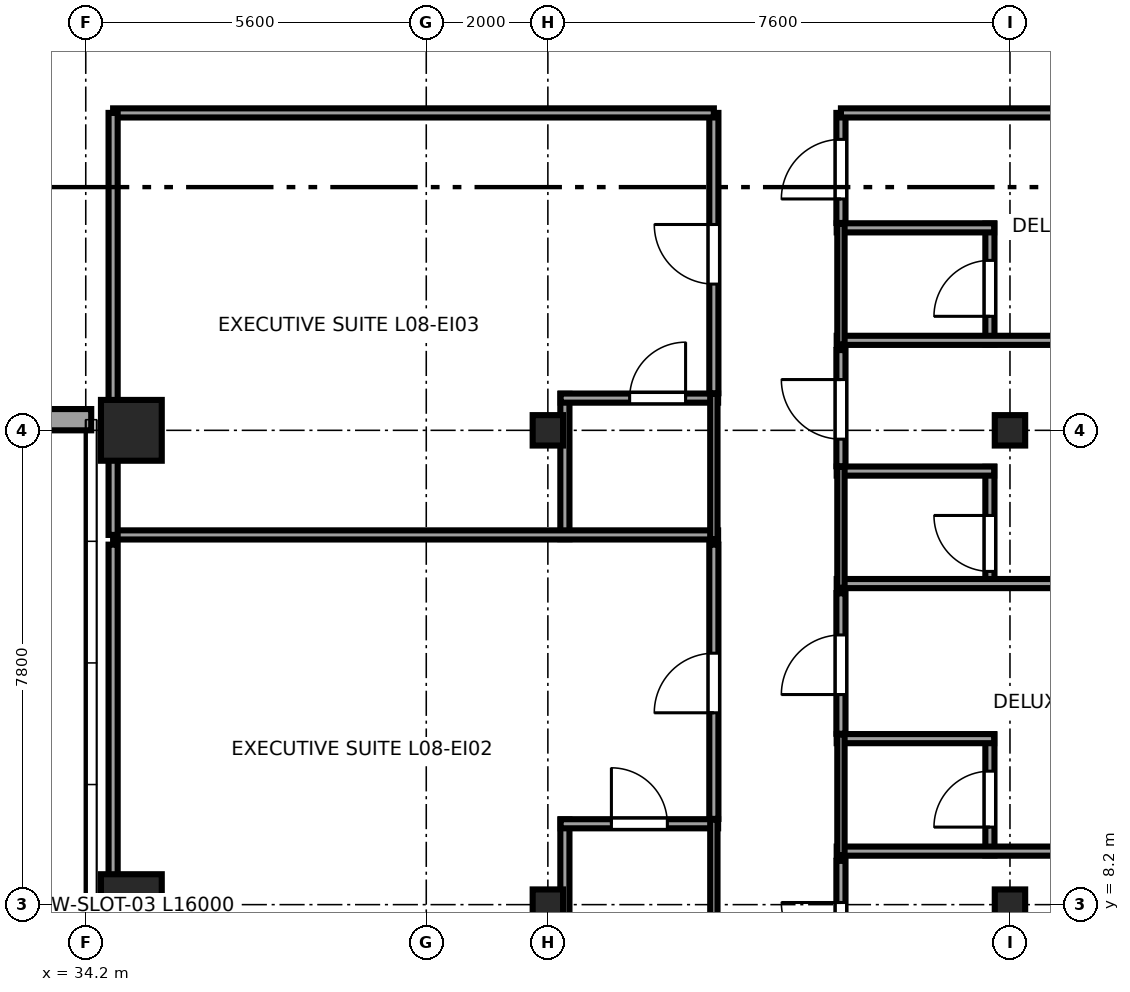
"""IFC4 building model, lengths in metres.
Left out: names, types, materials, properties, quantities, classifications, styles, units other than length and angle.
Written with IfcOpenShell. Run it as: python <this file> out.ifc"""

import sys

from ifc_helpers import new_model, si_unit, direction, frame, frame_2d, origin, origin_2d, place, context, subcontext, project, spatial, rectangle, i_section, extrude, source, transform, mapped, element, fill, save


model = new_model("IFC4")
c1 = context("Model", 3, precision=1e-05, world=origin(), true_north=direction((0.0, 1.0)))
c2 = subcontext(c1, "Body", "Model", "MODEL_VIEW")
j1 = project(units=[si_unit("LENGTHUNIT", "METRE"), si_unit("PLANEANGLEUNIT", "RADIAN")], contexts=[c1])
p1 = place(None, origin())
s1 = spatial("IfcSite", under=j1, at=p1, CompositionType="ELEMENT")
p2 = place(p1, origin())
s2 = spatial("IfcBuilding", under=s1, at=p2, CompositionType="ELEMENT")
p3 = place(p2, frame((0.0, 0.0, 39.1)))
s3 = spatial("IfcBuildingStorey", under=s2, at=p3, CompositionType="ELEMENT", Elevation=39.1)
m1 = source(origin(), c2, "Body", "SweptSolid", [
    extrude(rectangle(XDim=1.0, YDim=1.0, at=origin_2d()), origin(), (0.0, 0.0, 1.0), 3.55),
])
for number, where, z_axis, x_axis in (
    (1, (34.95, 8.2, 0.0), (0.0, 0.0, 1.0), (1.0, 0.0, 0.0)),
    (2, (34.95, 16.0, 0.0), (0.0, 0.0, 1.0), (1.0, 0.0, 0.0)),
):
    element("IfcColumn", number, at=place(p3, frame(where, z_axis=z_axis, x_axis=x_axis)), inside=s3, PredefinedType="COLUMN", context=c2, shape_type="MappedRepresentation", body=[
        mapped(m1, transform((0.0, 0.0, 0.0), x_axis=(1.0, 0.0, 0.0), y_axis=(0.0, 1.0, 0.0), z_axis=(0.0, 0.0, 1.0), scale=1.0)),
    ])
m2 = source(origin(), c2, "Body", "SweptSolid", [
    extrude(i_section(OverallWidth=0.5, OverallDepth=0.5, WebThickness=0.028, FlangeThickness=0.045, at=origin_2d()), origin(), (0.0, 0.0, 1.0), 3.55),
])
for number, where, z_axis, x_axis in (
    (3, (41.8, 8.2, 0.0), (0.0, 0.0, 1.0), (1.0, 0.0, 0.0)),
    (4, (41.8, 16.0, 0.0), (0.0, 0.0, 1.0), (1.0, 0.0, 0.0)),
    (5, (49.4, 8.2, 0.0), (0.0, 0.0, 1.0), (1.0, 0.0, 0.0)),
    (6, (49.4, 16.0, 0.0), (0.0, 0.0, 1.0), (1.0, 0.0, 0.0)),
):
    element("IfcColumn", number, at=place(p3, frame(where, z_axis=z_axis, x_axis=x_axis)), inside=s3, PredefinedType="COLUMN", context=c2, shape_type="MappedRepresentation", body=[
        mapped(m2, transform((0.0, 0.0, 0.0), x_axis=(1.0, 0.0, 0.0), y_axis=(0.0, 1.0, 0.0), z_axis=(0.0, 0.0, 1.0), scale=1.0)),
    ])
p4 = place(p3, frame((22.71, 16.175, 0.0), z_axis=(0.0, 0.0, 1.0), x_axis=(1.0, 0.0, 0.0)))
e7 = element("IfcWall", 7, at=p4, inside=s3, PredefinedType="SOLIDWALL", context=c2, shape_type="SweptSolid", body=[
    extrude(rectangle(XDim=11.58, YDim=0.35, at=frame_2d((5.79, 0.0))), origin(), (0.0, 0.0, 1.0), 2.748),
])
p5 = place(p4, frame((2.295, 0.0, 0.68)))
e8 = element("IfcOpeningElement", 8, at=p5, cuts=e7, PredefinedType="OPENING", context=c2, shape_type="SweptSolid", body=[
    extrude(rectangle(XDim=1.8, YDim=1.85, at=frame_2d((0.9, 0.925))), frame((0.0, 0.185, 0.0), z_axis=(0.0, -1.0, 0.0), x_axis=(1.0, 0.0, 0.0)), (0.0, 0.0, 1.0), 0.37),
])
p6 = place(p4, frame((7.485, 0.0, 0.68)))
e9 = element("IfcOpeningElement", 9, at=p6, cuts=e7, PredefinedType="OPENING", context=c2, shape_type="SweptSolid", body=[
    extrude(rectangle(XDim=1.8, YDim=1.85, at=frame_2d((0.9, 0.925))), frame((0.0, 0.185, 0.0), z_axis=(0.0, -1.0, 0.0), x_axis=(1.0, 0.0, 0.0)), (0.0, 0.0, 1.0), 0.37),
])
p7 = place(p3, frame((42.08, 7.21, 0.0), z_axis=(0.0, 0.0, 1.0), x_axis=(0.0, 1.0, 0.0)))
e10 = element("IfcWall", 10, at=p7, inside=s3, PredefinedType="PARTITIONING", context=c2, shape_type="SweptSolid", body=[
    extrude(rectangle(XDim=2.39, YDim=0.15, at=frame_2d((1.195, 0.0))), origin(), (0.0, 0.0, 1.0), 3.37),
])
p8 = place(p3, frame((42.01, 9.53, 0.0), z_axis=(0.0, 0.0, 1.0), x_axis=(1.0, 0.0, 0.0)))
e11 = element("IfcWall", 11, at=p8, inside=s3, PredefinedType="PARTITIONING", context=c2, shape_type="SweptSolid", body=[
    extrude(rectangle(XDim=2.59, YDim=0.15, at=frame_2d((1.295, 0.0))), origin(), (0.0, 0.0, 1.0), 3.37),
])
p9 = place(p8, frame((0.835, 0.0, 0.0)))
e12 = element("IfcOpeningElement", 12, at=p9, cuts=e11, PredefinedType="OPENING", context=c2, shape_type="SweptSolid", body=[
    extrude(rectangle(XDim=0.92, YDim=2.01, at=frame_2d((0.46, 1.005))), frame((0.0, 0.085, 0.0), z_axis=(0.0, -1.0, 0.0), x_axis=(1.0, 0.0, 0.0)), (0.0, 0.0, 1.0), 0.17),
])
p10 = place(p3, frame((44.53, 7.21, 0.0), z_axis=(0.0, 0.0, 1.0), x_axis=(0.0, 1.0, 0.0)))
e13 = element("IfcWall", 13, at=p10, inside=s3, PredefinedType="PLUMBINGWALL", context=c2, shape_type="SweptSolid", body=[
    extrude(rectangle(XDim=2.39, YDim=0.12, at=frame_2d((1.195, 0.0))), origin(), (0.0, 0.0, 1.0), 3.37),
])
p11 = place(p3, frame((42.08, 14.21, 0.0), z_axis=(0.0, 0.0, 1.0), x_axis=(0.0, 1.0, 0.0)))
e14 = element("IfcWall", 14, at=p11, inside=s3, PredefinedType="PARTITIONING", context=c2, shape_type="SweptSolid", body=[
    extrude(rectangle(XDim=2.39, YDim=0.15, at=frame_2d((1.195, 0.0))), origin(), (0.0, 0.0, 1.0), 3.37),
])
p12 = place(p3, frame((34.65, 14.28, 0.0), z_axis=(0.0, 0.0, 1.0), x_axis=(1.0, 0.0, 0.0)))
e15 = element("IfcWall", 15, at=p12, inside=s3, PredefinedType="PARTITIONING", context=c2, shape_type="SweptSolid", body=[
    extrude(rectangle(XDim=9.95, YDim=0.15, at=frame_2d((4.975, 0.0))), origin(), (0.0, 0.0, 1.0), 3.37),
])
p13 = place(p3, frame((42.01, 16.53, 0.0), z_axis=(0.0, 0.0, 1.0), x_axis=(1.0, 0.0, 0.0)))
e16 = element("IfcWall", 16, at=p13, inside=s3, PredefinedType="PARTITIONING", context=c2, shape_type="SweptSolid", body=[
    extrude(rectangle(XDim=2.59, YDim=0.15, at=frame_2d((1.295, 0.0))), origin(), (0.0, 0.0, 1.0), 3.37),
])
p14 = place(p13, frame((1.135, 0.0, 0.0)))
e17 = element("IfcOpeningElement", 17, at=p14, cuts=e16, PredefinedType="OPENING", context=c2, shape_type="SweptSolid", body=[
    extrude(rectangle(XDim=0.92, YDim=2.01, at=frame_2d((0.46, 1.005))), frame((0.0, 0.085, 0.0), z_axis=(0.0, -1.0, 0.0), x_axis=(1.0, 0.0, 0.0)), (0.0, 0.0, 1.0), 0.17),
])
p15 = place(p3, frame((44.53, 14.21, 0.0), z_axis=(0.0, 0.0, 1.0), x_axis=(0.0, 1.0, 0.0)))
e18 = element("IfcWall", 18, at=p15, inside=s3, PredefinedType="PLUMBINGWALL", context=c2, shape_type="SweptSolid", body=[
    extrude(rectangle(XDim=2.39, YDim=0.12, at=frame_2d((1.195, 0.0))), origin(), (0.0, 0.0, 1.0), 3.37),
])
p16 = place(p3, frame((49.07, 9.01, 0.0), z_axis=(0.0, 0.0, 1.0), x_axis=(0.0, 1.0, 0.0)))
e19 = element("IfcWall", 19, at=p16, inside=s3, PredefinedType="PARTITIONING", context=c2, shape_type="SweptSolid", body=[
    extrude(rectangle(XDim=1.99, YDim=0.15, at=frame_2d((0.995, 0.0))), origin(), (0.0, 0.0, 1.0), 3.37),
])
p17 = place(p16, frame((0.465, 0.0, 0.0)))
e20 = element("IfcOpeningElement", 20, at=p17, cuts=e19, PredefinedType="OPENING", context=c2, shape_type="SweptSolid", body=[
    extrude(rectangle(XDim=0.92, YDim=2.01, at=frame_2d((0.46, 1.005))), frame((0.0, 0.085, 0.0), z_axis=(0.0, -1.0, 0.0), x_axis=(1.0, 0.0, 0.0)), (0.0, 0.0, 1.0), 0.17),
])
p18 = place(p3, frame((46.55, 9.08, 0.0), z_axis=(0.0, 0.0, 1.0), x_axis=(1.0, 0.0, 0.0)))
e21 = element("IfcWall", 21, at=p18, inside=s3, PredefinedType="PARTITIONING", context=c2, shape_type="SweptSolid", body=[
    extrude(rectangle(XDim=10.045, YDim=0.15, at=frame_2d((5.022, 0.0))), origin(), (0.0, 0.0, 1.0), 3.37),
])
p19 = place(p3, frame((46.55, 10.93, 0.0), z_axis=(0.0, 0.0, 1.0), x_axis=(1.0, 0.0, 0.0)))
e22 = element("IfcWall", 22, at=p19, inside=s3, PredefinedType="PARTITIONING", context=c2, shape_type="SweptSolid", body=[
    extrude(rectangle(XDim=2.59, YDim=0.15, at=frame_2d((1.295, 0.0))), origin(), (0.0, 0.0, 1.0), 3.37),
])
p20 = place(p3, frame((46.62, 9.01, 0.0), z_axis=(0.0, 0.0, 1.0), x_axis=(0.0, 1.0, 0.0)))
e23 = element("IfcWall", 23, at=p20, inside=s3, PredefinedType="PLUMBINGWALL", context=c2, shape_type="SweptSolid", body=[
    extrude(rectangle(XDim=1.99, YDim=0.12, at=frame_2d((0.995, 0.0))), origin(), (0.0, 0.0, 1.0), 3.37),
])
p21 = place(p3, frame((49.07, 13.41, 0.0), z_axis=(0.0, 0.0, 1.0), x_axis=(0.0, 1.0, 0.0)))
e24 = element("IfcWall", 24, at=p21, inside=s3, PredefinedType="PARTITIONING", context=c2, shape_type="SweptSolid", body=[
    extrude(rectangle(XDim=1.99, YDim=0.15, at=frame_2d((0.995, 0.0))), origin(), (0.0, 0.0, 1.0), 3.37),
])
p22 = place(p21, frame((0.27, 0.0, 0.0)))
e25 = element("IfcOpeningElement", 25, at=p22, cuts=e24, PredefinedType="OPENING", context=c2, shape_type="SweptSolid", body=[
    extrude(rectangle(XDim=0.92, YDim=2.01, at=frame_2d((0.46, 1.005))), frame((0.0, 0.085, 0.0), z_axis=(0.0, -1.0, 0.0), x_axis=(1.0, 0.0, 0.0)), (0.0, 0.0, 1.0), 0.17),
])
p23 = place(p3, frame((46.55, 13.48, 0.0), z_axis=(0.0, 0.0, 1.0), x_axis=(1.0, 0.0, 0.0)))
e26 = element("IfcWall", 26, at=p23, inside=s3, PredefinedType="PARTITIONING", context=c2, shape_type="SweptSolid", body=[
    extrude(rectangle(XDim=10.045, YDim=0.15, at=frame_2d((5.022, 0.0))), origin(), (0.0, 0.0, 1.0), 3.37),
])
p24 = place(p3, frame((46.55, 15.33, 0.0), z_axis=(0.0, 0.0, 1.0), x_axis=(1.0, 0.0, 0.0)))
e27 = element("IfcWall", 27, at=p24, inside=s3, PredefinedType="PARTITIONING", context=c2, shape_type="SweptSolid", body=[
    extrude(rectangle(XDim=2.59, YDim=0.15, at=frame_2d((1.295, 0.0))), origin(), (0.0, 0.0, 1.0), 3.37),
])
p25 = place(p3, frame((46.62, 13.41, 0.0), z_axis=(0.0, 0.0, 1.0), x_axis=(0.0, 1.0, 0.0)))
e28 = element("IfcWall", 28, at=p25, inside=s3, PredefinedType="PLUMBINGWALL", context=c2, shape_type="SweptSolid", body=[
    extrude(rectangle(XDim=1.99, YDim=0.12, at=frame_2d((0.995, 0.0))), origin(), (0.0, 0.0, 1.0), 3.37),
])
p26 = place(p3, frame((49.07, 17.41, 0.0), z_axis=(0.0, 0.0, 1.0), x_axis=(0.0, 1.0, 0.0)))
e29 = element("IfcWall", 29, at=p26, inside=s3, PredefinedType="PARTITIONING", context=c2, shape_type="SweptSolid", body=[
    extrude(rectangle(XDim=1.99, YDim=0.15, at=frame_2d((0.995, 0.0))), origin(), (0.0, 0.0, 1.0), 3.37),
])
p27 = place(p26, frame((0.465, 0.0, 0.0)))
e30 = element("IfcOpeningElement", 30, at=p27, cuts=e29, PredefinedType="OPENING", context=c2, shape_type="SweptSolid", body=[
    extrude(rectangle(XDim=0.92, YDim=2.01, at=frame_2d((0.46, 1.005))), frame((0.0, 0.085, 0.0), z_axis=(0.0, -1.0, 0.0), x_axis=(1.0, 0.0, 0.0)), (0.0, 0.0, 1.0), 0.17),
])
p28 = place(p3, frame((46.55, 17.48, 0.0), z_axis=(0.0, 0.0, 1.0), x_axis=(1.0, 0.0, 0.0)))
e31 = element("IfcWall", 31, at=p28, inside=s3, PredefinedType="PARTITIONING", context=c2, shape_type="SweptSolid", body=[
    extrude(rectangle(XDim=10.045, YDim=0.15, at=frame_2d((5.022, 0.0))), origin(), (0.0, 0.0, 1.0), 3.37),
])
p29 = place(p3, frame((46.55, 19.33, 0.0), z_axis=(0.0, 0.0, 1.0), x_axis=(1.0, 0.0, 0.0)))
e32 = element("IfcWall", 32, at=p29, inside=s3, PredefinedType="PARTITIONING", context=c2, shape_type="SweptSolid", body=[
    extrude(rectangle(XDim=2.59, YDim=0.15, at=frame_2d((1.295, 0.0))), origin(), (0.0, 0.0, 1.0), 3.37),
])
p30 = place(p3, frame((46.62, 17.41, 0.0), z_axis=(0.0, 0.0, 1.0), x_axis=(0.0, 1.0, 0.0)))
e33 = element("IfcWall", 33, at=p30, inside=s3, PredefinedType="PLUMBINGWALL", context=c2, shape_type="SweptSolid", body=[
    extrude(rectangle(XDim=1.99, YDim=0.12, at=frame_2d((0.995, 0.0))), origin(), (0.0, 0.0, 1.0), 3.37),
])
p31 = place(p3, frame((44.53, 9.61, 0.0), z_axis=(0.0, 0.0, 1.0), x_axis=(0.0, 1.0, 0.0)))
e34 = element("IfcWall", 34, at=p31, inside=s3, PredefinedType="PARTITIONING", context=c2, shape_type="SweptSolid", body=[
    extrude(rectangle(XDim=4.51, YDim=0.15, at=frame_2d((2.255, 0.0))), origin(), (0.0, 0.0, 1.0), 3.37),
])
p32 = place(p31, frame((1.745, 0.0, 0.0)))
e35 = element("IfcOpeningElement", 35, at=p32, cuts=e34, PredefinedType="OPENING", context=c2, shape_type="SweptSolid", body=[
    extrude(rectangle(XDim=0.98, YDim=2.12, at=frame_2d((0.49, 1.06))), frame((0.0, 0.085, 0.0), z_axis=(0.0, -1.0, 0.0), x_axis=(1.0, 0.0, 0.0)), (0.0, 0.0, 1.0), 0.17),
])
p33 = place(p3, frame((34.65, 7.28, 0.0), z_axis=(0.0, 0.0, 1.0), x_axis=(0.0, 1.0, 0.0)))
e36 = element("IfcWall", 36, at=p33, inside=s3, PredefinedType="PARTITIONING", context=c2, shape_type="SweptSolid", body=[
    extrude(rectangle(XDim=6.84, YDim=0.15, at=frame_2d((3.42, 0.0))), origin(), (0.0, 0.0, 1.0), 3.37),
])
p34 = place(p3, frame((44.53, 16.61, 0.0), z_axis=(0.0, 0.0, 1.0), x_axis=(0.0, 1.0, 0.0)))
e37 = element("IfcWall", 37, at=p34, inside=s3, PredefinedType="PARTITIONING", context=c2, shape_type="SweptSolid", body=[
    extrude(rectangle(XDim=4.61, YDim=0.15, at=frame_2d((2.305, 0.0))), origin(), (0.0, 0.0, 1.0), 3.37),
])
p35 = place(p34, frame((1.795, 0.0, 0.0)))
e38 = element("IfcOpeningElement", 38, at=p35, cuts=e37, PredefinedType="OPENING", context=c2, shape_type="SweptSolid", body=[
    extrude(rectangle(XDim=0.98, YDim=2.12, at=frame_2d((0.49, 1.06))), frame((0.0, 0.085, 0.0), z_axis=(0.0, -1.0, 0.0), x_axis=(1.0, 0.0, 0.0)), (0.0, 0.0, 1.0), 0.17),
])
p36 = place(p3, frame((34.65, 21.22, 0.0), z_axis=(0.0, 0.0, 1.0), x_axis=(1.0, 0.0, 0.0)))
e39 = element("IfcWall", 39, at=p36, inside=s3, PredefinedType="PARTITIONING", context=c2, shape_type="SweptSolid", body=[
    extrude(rectangle(XDim=9.88, YDim=0.15, at=frame_2d((4.94, 0.0))), origin(), (0.0, 0.0, 1.0), 3.37),
])
p37 = place(p3, frame((34.65, 14.28, 0.0), z_axis=(0.0, 0.0, 1.0), x_axis=(0.0, 1.0, 0.0)))
e40 = element("IfcWall", 40, at=p37, inside=s3, PredefinedType="PARTITIONING", context=c2, shape_type="SweptSolid", body=[
    extrude(rectangle(XDim=6.94, YDim=0.15, at=frame_2d((3.47, 0.0))), origin(), (0.0, 0.0, 1.0), 3.37),
])
p38 = place(p3, frame((46.62, 6.61, 0.0), z_axis=(0.0, 0.0, 1.0), x_axis=(0.0, 1.0, 0.0)))
e41 = element("IfcWall", 41, at=p38, inside=s3, PredefinedType="PARTITIONING", context=c2, shape_type="SweptSolid", body=[
    extrude(rectangle(XDim=2.31, YDim=0.15, at=frame_2d((1.155, 0.0))), origin(), (0.0, 0.0, 1.0), 3.37),
])
p39 = place(p38, frame((0.645, 0.0, 0.0)))
e42 = element("IfcOpeningElement", 42, at=p39, cuts=e41, PredefinedType="OPENING", context=c2, shape_type="SweptSolid", body=[
    extrude(rectangle(XDim=0.98, YDim=2.12, at=frame_2d((0.49, 1.06))), frame((0.0, 0.085, 0.0), z_axis=(0.0, -1.0, 0.0), x_axis=(1.0, 0.0, 0.0)), (0.0, 0.0, 1.0), 0.17),
])
p40 = place(p3, frame((46.62, 11.01, 0.0), z_axis=(0.0, 0.0, 1.0), x_axis=(0.0, 1.0, 0.0)))
e43 = element("IfcWall", 43, at=p40, inside=s3, PredefinedType="PARTITIONING", context=c2, shape_type="SweptSolid", body=[
    extrude(rectangle(XDim=2.31, YDim=0.15, at=frame_2d((1.155, 0.0))), origin(), (0.0, 0.0, 1.0), 3.37),
])
p41 = place(p40, frame((0.645, 0.0, 0.0)))
e44 = element("IfcOpeningElement", 44, at=p41, cuts=e43, PredefinedType="OPENING", context=c2, shape_type="SweptSolid", body=[
    extrude(rectangle(XDim=0.98, YDim=2.12, at=frame_2d((0.49, 1.06))), frame((0.0, 0.085, 0.0), z_axis=(0.0, -1.0, 0.0), x_axis=(1.0, 0.0, 0.0)), (0.0, 0.0, 1.0), 0.17),
])
p42 = place(p3, frame((46.62, 15.41, 0.0), z_axis=(0.0, 0.0, 1.0), x_axis=(0.0, 1.0, 0.0)))
e45 = element("IfcWall", 45, at=p42, inside=s3, PredefinedType="PARTITIONING", context=c2, shape_type="SweptSolid", body=[
    extrude(rectangle(XDim=1.91, YDim=0.15, at=frame_2d((0.955, 0.0))), origin(), (0.0, 0.0, 1.0), 3.37),
])
p43 = place(p42, frame((0.445, 0.0, 0.0)))
e46 = element("IfcOpeningElement", 46, at=p43, cuts=e45, PredefinedType="OPENING", context=c2, shape_type="SweptSolid", body=[
    extrude(rectangle(XDim=0.98, YDim=2.12, at=frame_2d((0.49, 1.06))), frame((0.0, 0.085, 0.0), z_axis=(0.0, -1.0, 0.0), x_axis=(1.0, 0.0, 0.0)), (0.0, 0.0, 1.0), 0.17),
])
p44 = place(p3, frame((46.62, 19.41, 0.0), z_axis=(0.0, 0.0, 1.0), x_axis=(0.0, 1.0, 0.0)))
e47 = element("IfcWall", 47, at=p44, inside=s3, PredefinedType="PARTITIONING", context=c2, shape_type="SweptSolid", body=[
    extrude(rectangle(XDim=1.81, YDim=0.15, at=frame_2d((0.905, 0.0))), origin(), (0.0, 0.0, 1.0), 3.37),
])
p45 = place(p44, frame((0.395, 0.0, 0.0)))
e48 = element("IfcOpeningElement", 48, at=p45, cuts=e47, PredefinedType="OPENING", context=c2, shape_type="SweptSolid", body=[
    extrude(rectangle(XDim=0.98, YDim=2.12, at=frame_2d((0.49, 1.06))), frame((0.0, 0.085, 0.0), z_axis=(0.0, -1.0, 0.0), x_axis=(1.0, 0.0, 0.0)), (0.0, 0.0, 1.0), 0.17),
])
p46 = place(p3, frame((46.62, 21.22, 0.0), z_axis=(0.0, 0.0, 1.0), x_axis=(1.0, 0.0, 0.0)))
e49 = element("IfcWall", 49, at=p46, inside=s3, PredefinedType="PARTITIONING", context=c2, shape_type="SweptSolid", body=[
    extrude(rectangle(XDim=9.975, YDim=0.15, at=frame_2d((4.987, 0.0))), origin(), (0.0, 0.0, 1.0), 3.37),
])
m3 = source(origin(), c2, "Body", "SweptSolid", [
    extrude(rectangle(XDim=0.92, YDim=2.01, at=frame_2d((0.46, 1.005))), frame((0.0, 0.025, 0.0), z_axis=(0.0, -1.0, 0.0), x_axis=(1.0, 0.0, 0.0)), (0.0, 0.0, 1.0), 0.05),
])
p47 = place(p9, origin())
e50 = element("IfcDoor", 50, at=p47, inside=s3, OperationType="SINGLE_SWING_LEFT", PredefinedType="DOOR", context=c2, shape_type="MappedRepresentation", body=[
    mapped(m3, transform((0.0, 0.0, 0.0), x_axis=(1.0, 0.0, 0.0), y_axis=(0.0, 1.0, 0.0), z_axis=(0.0, 0.0, 1.0), scale=1.0)),
])
fill(e12, e50)
p48 = place(p14, origin())
e51 = element("IfcDoor", 51, at=p48, inside=s3, OperationType="SINGLE_SWING_RIGHT", PredefinedType="DOOR", context=c2, shape_type="MappedRepresentation", body=[
    mapped(m3, transform((0.0, 0.0, 0.0), x_axis=(1.0, 0.0, 0.0), y_axis=(0.0, 1.0, 0.0), z_axis=(0.0, 0.0, 1.0), scale=1.0)),
])
fill(e17, e51)
p49 = place(p17, origin())
e52 = element("IfcDoor", 52, at=p49, inside=s3, OperationType="SINGLE_SWING_LEFT", PredefinedType="DOOR", context=c2, shape_type="MappedRepresentation", body=[
    mapped(m3, transform((0.0, 0.0, 0.0), x_axis=(1.0, 0.0, 0.0), y_axis=(0.0, 1.0, 0.0), z_axis=(0.0, 0.0, 1.0), scale=1.0)),
])
fill(e20, e52)
p50 = place(p22, origin())
e53 = element("IfcDoor", 53, at=p50, inside=s3, OperationType="SINGLE_SWING_RIGHT", PredefinedType="DOOR", context=c2, shape_type="MappedRepresentation", body=[
    mapped(m3, transform((0.0, 0.0, 0.0), x_axis=(1.0, 0.0, 0.0), y_axis=(0.0, 1.0, 0.0), z_axis=(0.0, 0.0, 1.0), scale=1.0)),
])
fill(e25, e53)
p51 = place(p27, origin())
e54 = element("IfcDoor", 54, at=p51, inside=s3, OperationType="SINGLE_SWING_LEFT", PredefinedType="DOOR", context=c2, shape_type="MappedRepresentation", body=[
    mapped(m3, transform((0.0, 0.0, 0.0), x_axis=(1.0, 0.0, 0.0), y_axis=(0.0, 1.0, 0.0), z_axis=(0.0, 0.0, 1.0), scale=1.0)),
])
fill(e30, e54)
m4 = source(origin(), c2, "Body", "SweptSolid", [
    extrude(rectangle(XDim=0.98, YDim=2.12, at=frame_2d((0.49, 1.06))), frame((0.0, 0.025, 0.0), z_axis=(0.0, -1.0, 0.0), x_axis=(1.0, 0.0, 0.0)), (0.0, 0.0, 1.0), 0.05),
])
p52 = place(p32, origin())
e55 = element("IfcDoor", 55, at=p52, inside=s3, OperationType="SINGLE_SWING_LEFT", PredefinedType="DOOR", context=c2, shape_type="MappedRepresentation", body=[
    mapped(m4, transform((0.0, 0.0, 0.0), x_axis=(1.0, 0.0, 0.0), y_axis=(0.0, 1.0, 0.0), z_axis=(0.0, 0.0, 1.0), scale=1.0)),
])
fill(e35, e55)
p53 = place(p35, origin())
e56 = element("IfcDoor", 56, at=p53, inside=s3, OperationType="SINGLE_SWING_RIGHT", PredefinedType="DOOR", context=c2, shape_type="MappedRepresentation", body=[
    mapped(m4, transform((0.0, 0.0, 0.0), x_axis=(1.0, 0.0, 0.0), y_axis=(0.0, 1.0, 0.0), z_axis=(0.0, 0.0, 1.0), scale=1.0)),
])
fill(e38, e56)
p54 = place(p39, origin())
e57 = element("IfcDoor", 57, at=p54, inside=s3, OperationType="SINGLE_SWING_RIGHT", PredefinedType="DOOR", context=c2, shape_type="MappedRepresentation", body=[
    mapped(m4, transform((0.0, 0.0, 0.0), x_axis=(1.0, 0.0, 0.0), y_axis=(0.0, 1.0, 0.0), z_axis=(0.0, 0.0, 1.0), scale=1.0)),
])
fill(e42, e57)
p55 = place(p41, origin())
e58 = element("IfcDoor", 58, at=p55, inside=s3, OperationType="SINGLE_SWING_LEFT", PredefinedType="DOOR", context=c2, shape_type="MappedRepresentation", body=[
    mapped(m4, transform((0.0, 0.0, 0.0), x_axis=(1.0, 0.0, 0.0), y_axis=(0.0, 1.0, 0.0), z_axis=(0.0, 0.0, 1.0), scale=1.0)),
])
fill(e44, e58)
p56 = place(p43, origin())
e59 = element("IfcDoor", 59, at=p56, inside=s3, OperationType="SINGLE_SWING_RIGHT", PredefinedType="DOOR", context=c2, shape_type="MappedRepresentation", body=[
    mapped(m4, transform((0.0, 0.0, 0.0), x_axis=(1.0, 0.0, 0.0), y_axis=(0.0, 1.0, 0.0), z_axis=(0.0, 0.0, 1.0), scale=1.0)),
])
fill(e46, e59)
p57 = place(p45, origin())
e60 = element("IfcDoor", 60, at=p57, inside=s3, OperationType="SINGLE_SWING_LEFT", PredefinedType="DOOR", context=c2, shape_type="MappedRepresentation", body=[
    mapped(m4, transform((0.0, 0.0, 0.0), x_axis=(1.0, 0.0, 0.0), y_axis=(0.0, 1.0, 0.0), z_axis=(0.0, 0.0, 1.0), scale=1.0)),
])
fill(e48, e60)
save(model, sys.argv[1])
